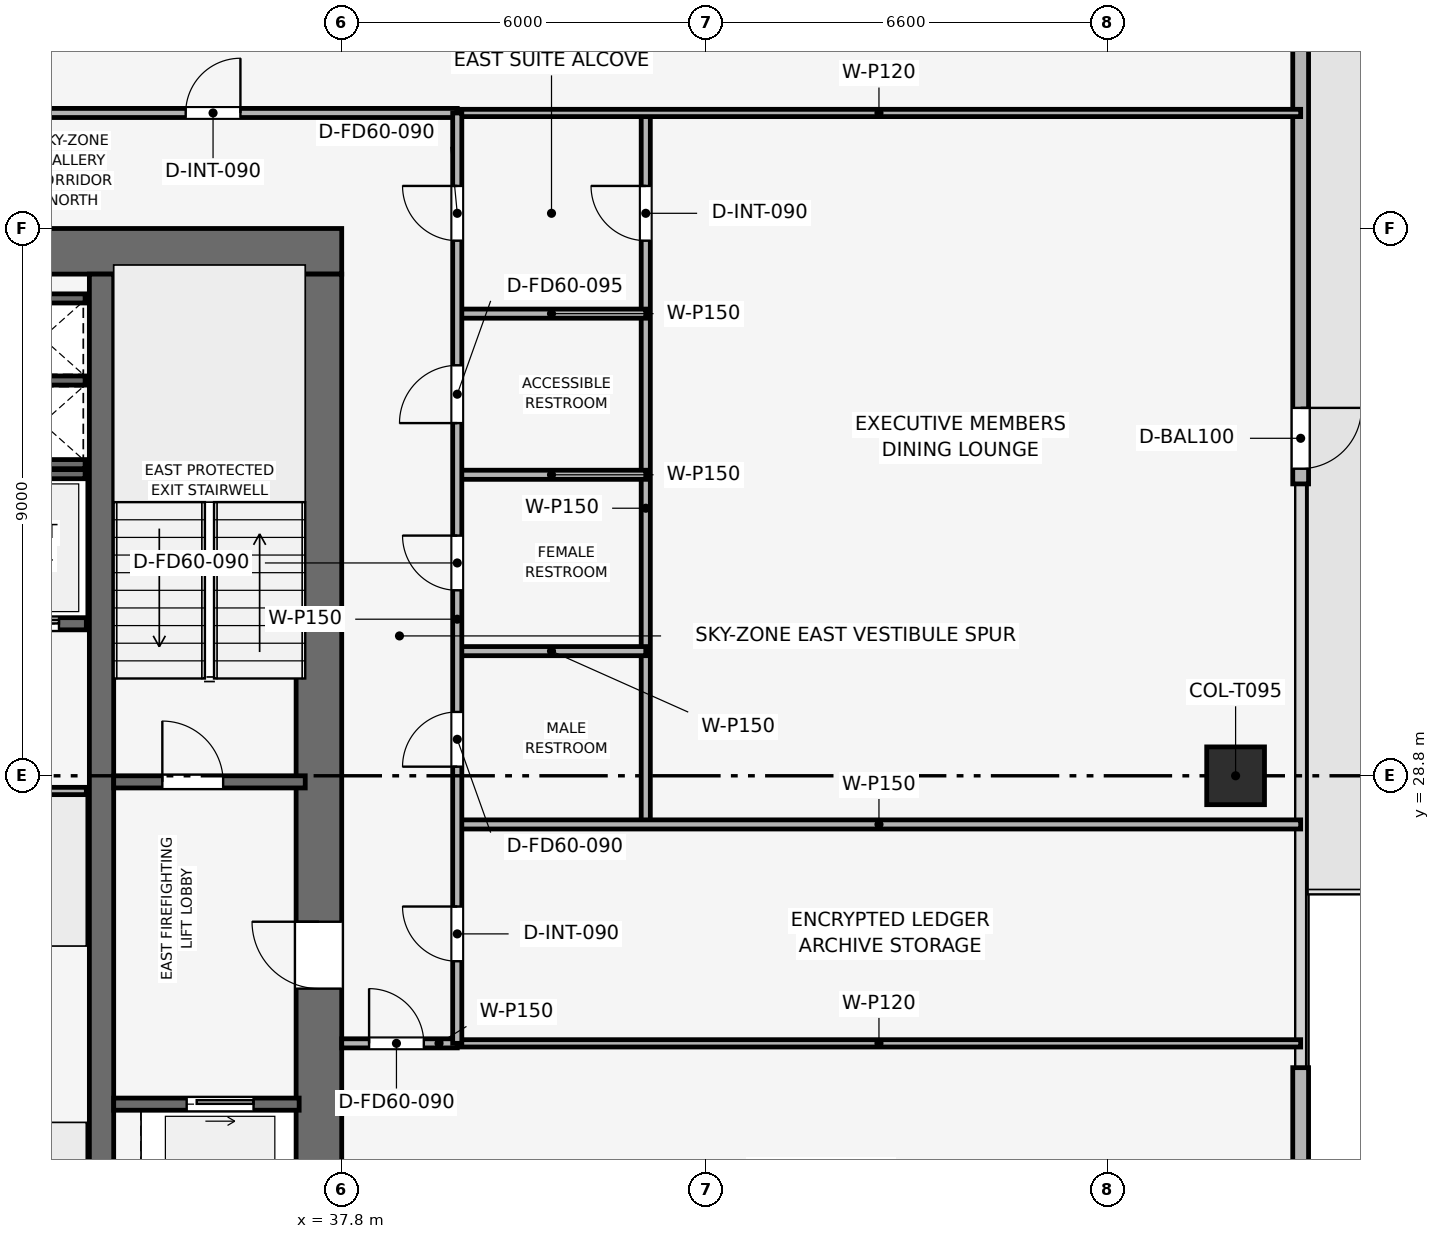
"""IFC4 building model, lengths in metres.
Left out: names, types, materials, properties, quantities, classifications, styles, units other than length and angle.
Written with IfcOpenShell. Run it as: python <this file> out.ifc"""

import sys

from ifc_helpers import new_model, si_unit, direction, frame, frame_2d, origin, origin_2d, place, context, subcontext, project, spatial, rectangle, extrude, element, fill, save


model = new_model("IFC4")
c1 = context("Model", 3, precision=1e-05, world=origin(), true_north=direction((0.0, 1.0)))
c2 = subcontext(c1, "Body", "Model", "MODEL_VIEW")
j1 = project(units=[si_unit("LENGTHUNIT", "METRE"), si_unit("PLANEANGLEUNIT", "RADIAN")], contexts=[c1])
p1 = place(None, origin())
s1 = spatial("IfcSite", under=j1, at=p1, CompositionType="ELEMENT")
p2 = place(p1, origin())
s2 = spatial("IfcBuilding", under=s1, at=p2, CompositionType="ELEMENT")
p3 = place(p2, frame((0.0, 0.0, 269.1)))
s3 = spatial("IfcBuildingStorey", under=s2, at=p3, CompositionType="ELEMENT", Elevation=269.1)
p4 = place(p3, frame((19.8, 37.425, 0.0), z_axis=(0.0, 0.0, 1.0), x_axis=(1.0, 0.0, 0.0)))
e1 = element("IfcWall", 1, at=p4, inside=s3, PredefinedType="SHEAR", context=c2, shape_type="SweptSolid", body=[
    extrude(rectangle(XDim=18.0, YDim=0.75, at=frame_2d((9.0, 0.0))), origin(), (0.0, 0.0, 1.0), 3.75),
])
p5 = place(p4, frame((7.05, 0.0, 0.0)))
e2 = element("IfcOpeningElement", 2, at=p5, cuts=e1, PredefinedType="OPENING", context=c2, shape_type="SweptSolid", body=[
    extrude(rectangle(XDim=1.1, YDim=2.15, at=frame_2d((0.55, 1.075))), frame((0.0, 0.385, 0.0), z_axis=(0.0, -1.0, 0.0), x_axis=(1.0, 0.0, 0.0)), (0.0, 0.0, 1.0), 0.77),
])
p6 = place(p3, frame((37.425, 20.55, 0.0), z_axis=(0.0, 0.0, 1.0), x_axis=(0.0, 1.0, 0.0)))
e3 = element("IfcWall", 3, at=p6, inside=s3, PredefinedType="SHEAR", context=c2, shape_type="SweptSolid", body=[
    extrude(rectangle(XDim=16.5, YDim=0.75, at=frame_2d((8.25, 0.0))), origin(), (0.0, 0.0, 1.0), 3.75),
])
p7 = place(p6, frame((4.75, 0.0, 0.0)))
e4 = element("IfcOpeningElement", 4, at=p7, cuts=e3, PredefinedType="OPENING", context=c2, shape_type="SweptSolid", body=[
    extrude(rectangle(XDim=1.1, YDim=2.15, at=frame_2d((0.55, 1.075))), frame((0.0, 0.385, 0.0), z_axis=(0.0, -1.0, 0.0), x_axis=(1.0, 0.0, 0.0)), (0.0, 0.0, 1.0), 0.77),
])
p8 = place(p3, frame((33.85, 20.55, 0.0), z_axis=(0.0, 0.0, 1.0), x_axis=(0.0, 1.0, 0.0)))
e5 = element("IfcWall", 5, at=p8, inside=s3, PredefinedType="SHEAR", context=c2, shape_type="SweptSolid", body=[
    extrude(rectangle(XDim=16.5, YDim=0.4, at=frame_2d((8.25, 0.0))), origin(), (0.0, 0.0, 1.0), 3.75),
])
p9 = place(p3, frame((52.5, 28.8, 0.003), z_axis=(0.0, 0.0, 1.0), x_axis=(1.0, 0.0, 0.0)))
e6 = element("IfcColumn", 6, at=p9, inside=s3, PredefinedType="COLUMN", context=c2, shape_type="SweptSolid", body=[
    extrude(rectangle(XDim=0.95, YDim=0.95, at=origin_2d()), origin(), (0.0, 0.0, 1.0), 3.494),
])
p10 = place(p3, frame((53.57, 46.8, 0.0), z_axis=(0.0, 0.0, 1.0), x_axis=(0.0, -1.0, 0.0)))
e7 = element("IfcWall", 7, at=p10, inside=s3, PredefinedType="SOLIDWALL", context=c2, shape_type="SweptSolid", body=[
    extrude(rectangle(XDim=13.2, YDim=0.26, at=frame_2d((6.6, 0.0))), origin(), (0.0, 0.0, 1.0), 3.5),
])
p11 = place(p10, frame((11.95, 0.0, 0.0)))
e8 = element("IfcOpeningElement", 8, at=p11, cuts=e7, PredefinedType="OPENING", context=c2, shape_type="SweptSolid", body=[
    extrude(rectangle(XDim=1.0, YDim=2.2, at=frame_2d((0.5, 1.1))), frame((0.0, 0.14, 0.0), z_axis=(0.0, -1.0, 0.0), x_axis=(1.0, 0.0, 0.0)), (0.0, 0.0, 1.0), 0.28),
])
p12 = place(p3, frame((53.57, 24.0, 0.0), z_axis=(0.0, 0.0, 1.0), x_axis=(0.0, -1.0, 0.0)))
e9 = element("IfcWall", 9, at=p12, inside=s3, PredefinedType="SOLIDWALL", context=c2, shape_type="SweptSolid", body=[
    extrude(rectangle(XDim=13.2, YDim=0.26, at=frame_2d((6.6, 0.0))), origin(), (0.0, 0.0, 1.0), 3.5),
])
p13 = place(p12, frame((11.75, 0.0, 0.9)))
e10 = element("IfcOpeningElement", 10, at=p13, cuts=e9, PredefinedType="OPENING", context=c2, shape_type="SweptSolid", body=[
    extrude(rectangle(XDim=1.2, YDim=2.1, at=frame_2d((0.6, 1.05))), frame((0.0, 0.14, 0.0), z_axis=(0.0, -1.0, 0.0), x_axis=(1.0, 0.0, 0.0)), (0.0, 0.0, 1.0), 0.28),
])
p14 = place(p3, frame((34.05, 28.7, 0.0), z_axis=(0.0, 0.0, 1.0), x_axis=(1.0, 0.0, 0.0)))
e11 = element("IfcWall", 11, at=p14, inside=s3, PredefinedType="SHEAR", context=c2, shape_type="SweptSolid", body=[
    extrude(rectangle(XDim=3.15, YDim=0.2, at=frame_2d((1.575, 0.0))), origin(), (0.0, 0.0, 1.0), 3.5),
])
p15 = place(p14, frame((0.8, 0.0, 0.0)))
e12 = element("IfcOpeningElement", 12, at=p15, cuts=e11, PredefinedType="OPENING", context=c2, shape_type="SweptSolid", body=[
    extrude(rectangle(XDim=1.0, YDim=2.1, at=frame_2d((0.5, 1.05))), frame((0.0, 0.11, 0.0), z_axis=(0.0, -1.0, 0.0), x_axis=(1.0, 0.0, 0.0)), (0.0, 0.0, 1.0), 0.22),
])
for number, where, z_axis, x_axis in (
    (13, (32.25, 33.925, 0.0), (0.0, 0.0, 1.0), (1.0, 0.0, 0.0)),
    (14, (32.25, 35.3, 0.0), (0.0, 0.0, 1.0), (1.0, 0.0, 0.0)),
):
    element("IfcWall", number, at=place(p3, frame(where, z_axis=z_axis, x_axis=x_axis)), inside=s3, PredefinedType="SHEAR", context=c2, shape_type="SweptSolid", body=[
        extrude(rectangle(XDim=1.33, YDim=0.15, at=frame_2d((0.665, 0.0))), origin(), (0.0, 0.0, 1.0), 3.5),
    ])
p16 = place(p3, frame((34.05, 23.4, 0.0), z_axis=(0.0, 0.0, 1.0), x_axis=(1.0, 0.0, 0.0)))
e15 = element("IfcWall", 15, at=p16, inside=s3, PredefinedType="SHEAR", context=c2, shape_type="SweptSolid", body=[
    extrude(rectangle(XDim=3.05, YDim=0.2, at=frame_2d((1.525, 0.0))), origin(), (0.0, 0.0, 1.0), 3.5),
])
p17 = place(p16, frame((1.2, 0.0, 0.0)))
e16 = element("IfcOpeningElement", 16, at=p17, cuts=e15, PredefinedType="OPENING", context=c2, shape_type="SweptSolid", body=[
    extrude(rectangle(XDim=1.1, YDim=2.15, at=frame_2d((0.55, 1.075))), frame((0.0, 0.11, 0.0), z_axis=(0.0, -1.0, 0.0), x_axis=(1.0, 0.0, 0.0)), (0.0, 0.0, 1.0), 0.22),
])
p18 = place(p3, frame((31.6, 31.3, 0.0), z_axis=(0.0, 0.0, 1.0), x_axis=(1.0, 0.0, 0.0)))
e17 = element("IfcWall", 17, at=p18, inside=s3, PredefinedType="SHEAR", context=c2, shape_type="SweptSolid", body=[
    extrude(rectangle(XDim=2.0, YDim=0.2, at=frame_2d((1.0, 0.0))), origin(), (0.0, 0.0, 1.0), 3.5),
])
p19 = place(p18, frame((0.45, 0.0, 0.0)))
e18 = element("IfcOpeningElement", 18, at=p19, cuts=e17, PredefinedType="OPENING", context=c2, shape_type="SweptSolid", body=[
    extrude(rectangle(XDim=1.1, YDim=2.15, at=frame_2d((0.55, 1.075))), frame((0.0, 0.11, 0.0), z_axis=(0.0, -1.0, 0.0), x_axis=(1.0, 0.0, 0.0)), (0.0, 0.0, 1.0), 0.22),
])
p20 = place(p3, frame((32.25, 36.65, 0.0), z_axis=(0.0, 0.0, 1.0), x_axis=(1.0, 0.0, 0.0)))
e19 = element("IfcWall", 19, at=p20, inside=s3, PredefinedType="SHEAR", context=c2, shape_type="SweptSolid", body=[
    extrude(rectangle(XDim=1.33, YDim=0.15, at=frame_2d((0.665, 0.0))), origin(), (0.0, 0.0, 1.0), 3.5),
])
p21 = place(p3, frame((29.5, 33.76, 0.0), z_axis=(0.0, 0.0, 1.0), x_axis=(1.0, 0.0, 0.0)))
e20 = element("IfcWall", 20, at=p21, inside=s3, PredefinedType="SHEAR", context=c2, shape_type="SweptSolid", body=[
    extrude(rectangle(XDim=4.08, YDim=0.15, at=frame_2d((2.04, 0.0))), origin(), (0.0, 0.0, 1.0), 3.5),
])
p22 = place(p3, frame((29.55, 28.55, 0.0), z_axis=(0.0, 0.0, 1.0), x_axis=(1.0, 0.0, 0.0)))
e21 = element("IfcWall", 21, at=p22, inside=s3, PredefinedType="PARTITIONING", context=c2, shape_type="SweptSolid", body=[
    extrude(rectangle(XDim=4.05, YDim=0.12, at=frame_2d((2.025, 0.0))), origin(), (0.0, 0.0, 1.0), 3.5),
])
p23 = place(p22, frame((1.575, 0.0, 0.0)))
e22 = element("IfcOpeningElement", 22, at=p23, cuts=e21, PredefinedType="OPENING", context=c2, shape_type="SweptSolid", body=[
    extrude(rectangle(XDim=0.9, YDim=2.1, at=frame_2d((0.45, 1.05))), frame((0.0, 0.07, 0.0), z_axis=(0.0, -1.0, 0.0), x_axis=(1.0, 0.0, 0.0)), (0.0, 0.0, 1.0), 0.14),
])
p24 = place(p3, frame((37.8, 24.4, 0.0), z_axis=(0.0, 0.0, 1.0), x_axis=(1.0, 0.0, 0.0)))
e23 = element("IfcWall", 23, at=p24, inside=s3, PredefinedType="PARTITIONING", context=c2, shape_type="SweptSolid", body=[
    extrude(rectangle(XDim=1.9, YDim=0.15, at=frame_2d((0.95, 0.0))), origin(), (0.0, 0.0, 1.0), 3.5),
])
p25 = place(p24, frame((0.45, 0.0, 0.0)))
e24 = element("IfcOpeningElement", 24, at=p25, cuts=e23, PredefinedType="OPENING", context=c2, shape_type="SweptSolid", body=[
    extrude(rectangle(XDim=0.9, YDim=2.1, at=frame_2d((0.45, 1.05))), frame((0.0, 0.085, 0.0), z_axis=(0.0, -1.0, 0.0), x_axis=(1.0, 0.0, 0.0)), (0.0, 0.0, 1.0), 0.17),
])
p26 = place(p3, frame((39.7, 24.4, 0.0), z_axis=(0.0, 0.0, 1.0), x_axis=(1.0, 0.0, 0.0)))
e25 = element("IfcWall", 25, at=p26, inside=s3, PredefinedType="PARTITIONING", context=c2, shape_type="SweptSolid", body=[
    extrude(rectangle(XDim=13.87, YDim=0.12, at=frame_2d((6.935, 0.0))), origin(), (0.0, 0.0, 1.0), 3.085),
])
p27 = place(p3, frame((42.8, 28.0, 0.0), z_axis=(0.0, 0.0, 1.0), x_axis=(0.0, 1.0, 0.0)))
e26 = element("IfcWall", 26, at=p27, inside=s3, PredefinedType="PARTITIONING", context=c2, shape_type="SweptSolid", body=[
    extrude(rectangle(XDim=11.7, YDim=0.15, at=frame_2d((5.85, 0.0))), origin(), (0.0, 0.0, 1.0), 3.085),
])
p28 = place(p27, frame((9.6, 0.0, 0.0)))
e27 = element("IfcOpeningElement", 27, at=p28, cuts=e26, PredefinedType="OPENING", context=c2, shape_type="SweptSolid", body=[
    extrude(rectangle(XDim=0.9, YDim=2.1, at=frame_2d((0.45, 1.05))), frame((0.0, 0.085, 0.0), z_axis=(0.0, -1.0, 0.0), x_axis=(1.0, 0.0, 0.0)), (0.0, 0.0, 1.0), 0.17),
])
p29 = place(p3, frame((39.7, 28.0, 0.0), z_axis=(0.0, 0.0, 1.0), x_axis=(1.0, 0.0, 0.0)))
e28 = element("IfcWall", 28, at=p29, inside=s3, PredefinedType="PARTITIONING", context=c2, shape_type="SweptSolid", body=[
    extrude(rectangle(XDim=13.87, YDim=0.15, at=frame_2d((6.935, 0.0))), origin(), (0.0, 0.0, 1.0), 3.085),
])
for number, where, z_axis, x_axis in (
    (29, (39.7, 36.4, 0.0), (0.0, 0.0, 1.0), (1.0, 0.0, 0.0)),
    (30, (39.7, 30.85, 0.0), (0.0, 0.0, 1.0), (1.0, 0.0, 0.0)),
    (31, (39.7, 33.75, 0.0), (0.0, 0.0, 1.0), (1.0, 0.0, 0.0)),
):
    element("IfcWall", number, at=place(p3, frame(where, z_axis=z_axis, x_axis=x_axis)), inside=s3, PredefinedType="PARTITIONING", context=c2, shape_type="SweptSolid", body=[
        extrude(rectangle(XDim=3.1, YDim=0.15, at=frame_2d((1.55, 0.0))), origin(), (0.0, 0.0, 1.0), 3.5),
    ])
p30 = place(p3, frame((39.7, 39.7, 0.0), z_axis=(0.0, 0.0, 1.0), x_axis=(1.0, 0.0, 0.0)))
e32 = element("IfcWall", 32, at=p30, inside=s3, PredefinedType="PARTITIONING", context=c2, shape_type="SweptSolid", body=[
    extrude(rectangle(XDim=13.87, YDim=0.12, at=frame_2d((6.935, 0.0))), origin(), (0.0, 0.0, 1.0), 3.085),
])
p31 = place(p3, frame((17.9, 39.7, 0.0), z_axis=(0.0, 0.0, 1.0), x_axis=(1.0, 0.0, 0.0)))
e33 = element("IfcWall", 33, at=p31, inside=s3, PredefinedType="PARTITIONING", context=c2, shape_type="SweptSolid", body=[
    extrude(rectangle(XDim=21.8, YDim=0.15, at=frame_2d((10.9, 0.0))), origin(), (0.0, 0.0, 1.0), 3.085),
])
p32 = place(p31, frame((0.7, 0.0, 0.0)))
e34 = element("IfcOpeningElement", 34, at=p32, cuts=e33, PredefinedType="OPENING", context=c2, shape_type="SweptSolid", body=[
    extrude(rectangle(XDim=0.9, YDim=2.1, at=frame_2d((0.45, 1.05))), frame((0.0, 0.085, 0.0), z_axis=(0.0, -1.0, 0.0), x_axis=(1.0, 0.0, 0.0)), (0.0, 0.0, 1.0), 0.17),
])
p33 = place(p31, frame((4.801, 0.0, 0.0)))
e35 = element("IfcOpeningElement", 35, at=p33, cuts=e33, PredefinedType="OPENING", context=c2, shape_type="SweptSolid", body=[
    extrude(rectangle(XDim=0.9, YDim=2.1, at=frame_2d((0.45, 1.05))), frame((0.0, 0.085, 0.0), z_axis=(0.0, -1.0, 0.0), x_axis=(1.0, 0.0, 0.0)), (0.0, 0.0, 1.0), 0.17),
])
p34 = place(p31, frame((10.535, 0.0, 0.0)))
e36 = element("IfcOpeningElement", 36, at=p34, cuts=e33, PredefinedType="OPENING", context=c2, shape_type="SweptSolid", body=[
    extrude(rectangle(XDim=0.9, YDim=2.1, at=frame_2d((0.45, 1.05))), frame((0.0, 0.085, 0.0), z_axis=(0.0, -1.0, 0.0), x_axis=(1.0, 0.0, 0.0)), (0.0, 0.0, 1.0), 0.17),
])
p35 = place(p31, frame((17.334, 0.0, 0.0)))
e37 = element("IfcOpeningElement", 37, at=p35, cuts=e33, PredefinedType="OPENING", context=c2, shape_type="SweptSolid", body=[
    extrude(rectangle(XDim=0.9, YDim=2.1, at=frame_2d((0.45, 1.05))), frame((0.0, 0.085, 0.0), z_axis=(0.0, -1.0, 0.0), x_axis=(1.0, 0.0, 0.0)), (0.0, 0.0, 1.0), 0.17),
])
p36 = place(p3, frame((39.7, 24.4, 0.0), z_axis=(0.0, 0.0, 1.0), x_axis=(0.0, 1.0, 0.0)))
e38 = element("IfcWall", 38, at=p36, inside=s3, PredefinedType="PARTITIONING", context=c2, shape_type="SweptSolid", body=[
    extrude(rectangle(XDim=15.3, YDim=0.15, at=frame_2d((7.65, 0.0))), origin(), (0.0, 0.0, 1.0), 3.085),
])
p37 = place(p36, frame((1.35, 0.0, 0.0)))
e39 = element("IfcOpeningElement", 39, at=p37, cuts=e38, PredefinedType="OPENING", context=c2, shape_type="SweptSolid", body=[
    extrude(rectangle(XDim=0.9, YDim=2.1, at=frame_2d((0.45, 1.05))), frame((0.0, 0.085, 0.0), z_axis=(0.0, -1.0, 0.0), x_axis=(1.0, 0.0, 0.0)), (0.0, 0.0, 1.0), 0.17),
])
p38 = place(p36, frame((4.55, 0.0, 0.0)))
e40 = element("IfcOpeningElement", 40, at=p38, cuts=e38, PredefinedType="OPENING", context=c2, shape_type="SweptSolid", body=[
    extrude(rectangle(XDim=0.9, YDim=2.1, at=frame_2d((0.45, 1.05))), frame((0.0, 0.085, 0.0), z_axis=(0.0, -1.0, 0.0), x_axis=(1.0, 0.0, 0.0)), (0.0, 0.0, 1.0), 0.17),
])
p39 = place(p36, frame((7.45, 0.0, 0.0)))
e41 = element("IfcOpeningElement", 41, at=p39, cuts=e38, PredefinedType="OPENING", context=c2, shape_type="SweptSolid", body=[
    extrude(rectangle(XDim=0.9, YDim=2.1, at=frame_2d((0.45, 1.05))), frame((0.0, 0.085, 0.0), z_axis=(0.0, -1.0, 0.0), x_axis=(1.0, 0.0, 0.0)), (0.0, 0.0, 1.0), 0.17),
])
p40 = place(p36, frame((10.2, 0.0, 0.0)))
e42 = element("IfcOpeningElement", 42, at=p40, cuts=e38, PredefinedType="OPENING", context=c2, shape_type="SweptSolid", body=[
    extrude(rectangle(XDim=0.95, YDim=2.1, at=frame_2d((0.475, 1.05))), frame((0.0, 0.085, 0.0), z_axis=(0.0, -1.0, 0.0), x_axis=(1.0, 0.0, 0.0)), (0.0, 0.0, 1.0), 0.17),
])
p41 = place(p36, frame((13.2, 0.0, 0.0)))
e43 = element("IfcOpeningElement", 43, at=p41, cuts=e38, PredefinedType="OPENING", context=c2, shape_type="SweptSolid", body=[
    extrude(rectangle(XDim=0.9, YDim=2.1, at=frame_2d((0.45, 1.05))), frame((0.0, 0.085, 0.0), z_axis=(0.0, -1.0, 0.0), x_axis=(1.0, 0.0, 0.0)), (0.0, 0.0, 1.0), 0.17),
])
p42 = place(p11, origin())
e44 = element("IfcDoor", 44, at=p42, inside=s3, OperationType="SINGLE_SWING_LEFT", PredefinedType="DOOR", context=c2, shape_type="SweptSolid", body=[
    extrude(rectangle(XDim=1.0, YDim=2.2, at=frame_2d((0.5, 1.1))), frame((0.0, 0.025, 0.0), z_axis=(0.0, -1.0, 0.0), x_axis=(1.0, 0.0, 0.0)), (0.0, 0.0, 1.0), 0.05),
])
fill(e8, e44)
p43 = place(p15, origin())
e45 = element("IfcDoor", 45, at=p43, inside=s3, OperationType="SINGLE_SWING_LEFT", PredefinedType="DOOR", context=c2, shape_type="SweptSolid", body=[
    extrude(rectangle(XDim=1.0, YDim=2.1, at=frame_2d((0.5, 1.05))), frame((0.0, 0.025, 0.0), z_axis=(0.0, -1.0, 0.0), x_axis=(1.0, 0.0, 0.0)), (0.0, 0.0, 1.0), 0.05),
])
fill(e12, e45)
p44 = place(p17, origin())
e46 = element("IfcDoor", 46, at=p44, inside=s3, OperationType="SLIDING_TO_RIGHT", PredefinedType="DOOR", context=c2, shape_type="SweptSolid", body=[
    extrude(rectangle(XDim=1.1, YDim=2.15, at=frame_2d((0.55, 1.075))), frame((0.0, 0.025, 0.0), z_axis=(0.0, -1.0, 0.0), x_axis=(1.0, 0.0, 0.0)), (0.0, 0.0, 1.0), 0.05),
])
fill(e16, e46)
p45 = place(p19, origin())
e47 = element("IfcDoor", 47, at=p45, inside=s3, OperationType="SLIDING_TO_RIGHT", PredefinedType="DOOR", context=c2, shape_type="SweptSolid", body=[
    extrude(rectangle(XDim=1.1, YDim=2.15, at=frame_2d((0.55, 1.075))), frame((0.0, 0.025, 0.0), z_axis=(0.0, -1.0, 0.0), x_axis=(1.0, 0.0, 0.0)), (0.0, 0.0, 1.0), 0.05),
])
fill(e18, e47)
p46 = place(p25, origin())
e48 = element("IfcDoor", 48, at=p46, inside=s3, OperationType="SINGLE_SWING_LEFT", PredefinedType="DOOR", context=c2, shape_type="SweptSolid", body=[
    extrude(rectangle(XDim=0.9, YDim=2.1, at=frame_2d((0.45, 1.05))), frame((0.0, 0.025, 0.0), z_axis=(0.0, -1.0, 0.0), x_axis=(1.0, 0.0, 0.0)), (0.0, 0.0, 1.0), 0.05),
])
fill(e24, e48)
p47 = place(p28, origin())
e49 = element("IfcDoor", 49, at=p47, inside=s3, OperationType="SINGLE_SWING_RIGHT", PredefinedType="DOOR", context=c2, shape_type="SweptSolid", body=[
    extrude(rectangle(XDim=0.9, YDim=2.1, at=frame_2d((0.45, 1.05))), frame((0.0, 0.025, 0.0), z_axis=(0.0, -1.0, 0.0), x_axis=(1.0, 0.0, 0.0)), (0.0, 0.0, 1.0), 0.05),
])
fill(e27, e49)
p48 = place(p35, origin())
e50 = element("IfcDoor", 50, at=p48, inside=s3, OperationType="SINGLE_SWING_RIGHT", PredefinedType="DOOR", context=c2, shape_type="SweptSolid", body=[
    extrude(rectangle(XDim=0.9, YDim=2.1, at=frame_2d((0.45, 1.05))), frame((0.0, 0.025, 0.0), z_axis=(0.0, -1.0, 0.0), x_axis=(1.0, 0.0, 0.0)), (0.0, 0.0, 1.0), 0.05),
])
fill(e37, e50)
p49 = place(p37, origin())
e51 = element("IfcDoor", 51, at=p49, inside=s3, OperationType="SINGLE_SWING_RIGHT", PredefinedType="DOOR", context=c2, shape_type="SweptSolid", body=[
    extrude(rectangle(XDim=0.9, YDim=2.1, at=frame_2d((0.45, 1.05))), frame((0.0, 0.025, 0.0), z_axis=(0.0, -1.0, 0.0), x_axis=(1.0, 0.0, 0.0)), (0.0, 0.0, 1.0), 0.05),
])
fill(e39, e51)
p50 = place(p38, origin())
e52 = element("IfcDoor", 52, at=p50, inside=s3, OperationType="SINGLE_SWING_LEFT", PredefinedType="DOOR", context=c2, shape_type="SweptSolid", body=[
    extrude(rectangle(XDim=0.9, YDim=2.1, at=frame_2d((0.45, 1.05))), frame((0.0, 0.025, 0.0), z_axis=(0.0, -1.0, 0.0), x_axis=(1.0, 0.0, 0.0)), (0.0, 0.0, 1.0), 0.05),
])
fill(e40, e52)
p51 = place(p39, origin())
e53 = element("IfcDoor", 53, at=p51, inside=s3, OperationType="SINGLE_SWING_RIGHT", PredefinedType="DOOR", context=c2, shape_type="SweptSolid", body=[
    extrude(rectangle(XDim=0.9, YDim=2.1, at=frame_2d((0.45, 1.05))), frame((0.0, 0.025, 0.0), z_axis=(0.0, -1.0, 0.0), x_axis=(1.0, 0.0, 0.0)), (0.0, 0.0, 1.0), 0.05),
])
fill(e41, e53)
p52 = place(p40, origin())
e54 = element("IfcDoor", 54, at=p52, inside=s3, OperationType="SINGLE_SWING_LEFT", PredefinedType="DOOR", context=c2, shape_type="SweptSolid", body=[
    extrude(rectangle(XDim=0.95, YDim=2.1, at=frame_2d((0.475, 1.05))), frame((0.0, 0.025, 0.0), z_axis=(0.0, -1.0, 0.0), x_axis=(1.0, 0.0, 0.0)), (0.0, 0.0, 1.0), 0.05),
])
fill(e42, e54)
p53 = place(p41, origin())
e55 = element("IfcDoor", 55, at=p53, inside=s3, OperationType="SINGLE_SWING_RIGHT", PredefinedType="DOOR", context=c2, shape_type="SweptSolid", body=[
    extrude(rectangle(XDim=0.9, YDim=2.1, at=frame_2d((0.45, 1.05))), frame((0.0, 0.025, 0.0), z_axis=(0.0, -1.0, 0.0), x_axis=(1.0, 0.0, 0.0)), (0.0, 0.0, 1.0), 0.05),
])
fill(e43, e55)
p54 = place(p7, origin())
e56 = element("IfcDoor", 56, at=p54, inside=s3, OperationType="SINGLE_SWING_RIGHT", PredefinedType="DOOR", context=c2, shape_type="SweptSolid", body=[
    extrude(rectangle(XDim=1.1, YDim=2.15, at=frame_2d((0.55, 1.075))), frame((0.0, 0.025, 0.0), z_axis=(0.0, -1.0, 0.0), x_axis=(1.0, 0.0, 0.0)), (0.0, 0.0, 1.0), 0.05),
])
fill(e4, e56)
save(model, sys.argv[1])
